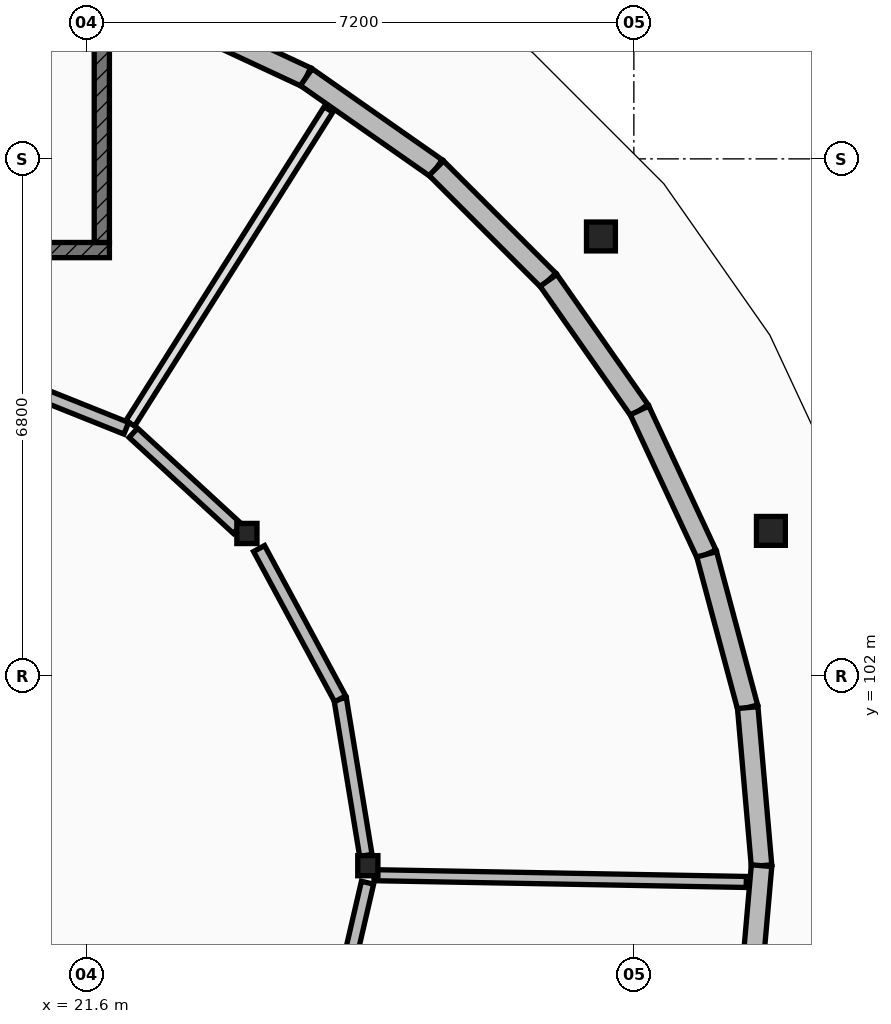
"""IFC4 building model, lengths in metres.
Left out: names, types, materials, properties, quantities, classifications, styles, units other than length and angle.
Written with IfcOpenShell. Run it as: python <this file> out.ifc"""

import sys

from ifc_helpers import new_model, si_unit, direction, frame, frame_2d, origin, origin_2d, place, context, subcontext, project, spatial, rectangle, circle, extrude, element, fill, save


model = new_model("IFC4")
c1 = context("Model", 3, precision=1e-05, world=origin(), true_north=direction((0.0, 1.0)))
c2 = subcontext(c1, "Body", "Model", "MODEL_VIEW")
j1 = project(units=[si_unit("LENGTHUNIT", "METRE"), si_unit("PLANEANGLEUNIT", "RADIAN")], contexts=[c1])
p1 = place(None, origin())
s1 = spatial("IfcSite", under=j1, at=p1, CompositionType="ELEMENT")
p2 = place(p1, origin())
s2 = spatial("IfcBuilding", under=s1, at=p2, CompositionType="ELEMENT")
p3 = place(p2, frame((0.0, 0.0, 21.35)))
s3 = spatial("IfcBuildingStorey", under=s2, at=p3, CompositionType="ELEMENT", Elevation=21.35)
for number, where, z_axis, x_axis in (
    (1, (30.603, 103.905, 0.0), (0.0, 0.0, 1.0), (1.0, 0.0, 0.0)),
    (2, (28.367, 107.779, 0.0), (0.0, 0.0, 1.0), (1.0, 0.0, 0.0)),
):
    element("IfcColumn", number, at=place(p3, frame(where, z_axis=z_axis, x_axis=x_axis)), inside=s3, PredefinedType="PILASTER", context=c2, shape_type="SweptSolid", body=[
        extrude(circle(Radius=0.19, at=origin_2d()), origin(), (0.0, 0.0, 1.0), 4.2),
    ])
for number, where, z_axis, x_axis in (
    (3, (25.3, 99.5, 0.0), (0.0, 0.0, 1.0), (1.0, 0.0, 0.0)),
    (4, (23.709, 103.871, 0.0), (0.0, 0.0, 1.0), (1.0, 0.0, 0.0)),
):
    element("IfcColumn", number, at=place(p3, frame(where, z_axis=z_axis, x_axis=x_axis)), inside=s3, PredefinedType="COLUMN", context=c2, shape_type="SweptSolid", body=[
        extrude(rectangle(XDim=0.265, YDim=0.265, at=origin_2d()), origin(), (0.0, 0.0, 1.0), 4.2),
    ])
p4 = place(p3, frame((22.597, 110.758, 0.0), z_axis=(0.0, 0.0, 1.0), x_axis=(0.906251803004, -0.422738299131, 0.0)))
e5 = element("IfcWall", 5, at=p4, inside=s3, PredefinedType="ELEMENTEDWALL", context=c2, shape_type="SweptSolid", body=[
    extrude(rectangle(XDim=2.089, YDim=0.27, at=frame_2d((1.044, 0.0))), origin(), (0.0, 0.0, 1.0), 3.314),
])
p5 = place(p4, frame((0.534, 0.0, 0.85)))
e6 = element("IfcOpeningElement", 6, at=p5, cuts=e5, PredefinedType="OPENING", context=c2, shape_type="SweptSolid", body=[
    extrude(rectangle(XDim=1.02, YDim=1.6, at=frame_2d((0.51, 0.8))), frame((0.0, 0.145, 0.0), z_axis=(0.0, -1.0, 0.0), x_axis=(1.0, 0.0, 0.0)), (0.0, 0.0, 1.0), 0.29),
])
p6 = place(p3, frame((24.49, 109.875, 0.0), z_axis=(0.0, 0.0, 1.0), x_axis=(0.819155033433, -0.573572167388, 0.0)))
e7 = element("IfcWall", 7, at=p6, inside=s3, PredefinedType="ELEMENTEDWALL", context=c2, shape_type="SweptSolid", body=[
    extrude(rectangle(XDim=2.089, YDim=0.27, at=frame_2d((1.044, 0.0))), origin(), (0.0, 0.0, 1.0), 3.314),
])
p7 = place(p6, frame((0.519, 0.0, 0.85)))
e8 = element("IfcOpeningElement", 8, at=p7, cuts=e7, PredefinedType="OPENING", context=c2, shape_type="SweptSolid", body=[
    extrude(rectangle(XDim=1.05, YDim=1.35, at=frame_2d((0.525, 0.675))), frame((0.0, 0.145, 0.0), z_axis=(0.0, -1.0, 0.0), x_axis=(1.0, 0.0, 0.0)), (0.0, 0.0, 1.0), 0.29),
])
p8 = place(p3, frame((26.201, 108.677, 0.0), z_axis=(0.0, 0.0, 1.0), x_axis=(0.707106781187, -0.707106781187, 0.0)))
e9 = element("IfcWall", 9, at=p8, inside=s3, PredefinedType="ELEMENTEDWALL", context=c2, shape_type="SweptSolid", body=[
    extrude(rectangle(XDim=2.087, YDim=0.27, at=frame_2d((1.044, 0.0))), origin(), (0.0, 0.0, 1.0), 3.314),
])
p9 = place(p8, frame((0.519, 0.0, 0.85)))
e10 = element("IfcOpeningElement", 10, at=p9, cuts=e9, PredefinedType="OPENING", context=c2, shape_type="SweptSolid", body=[
    extrude(rectangle(XDim=1.05, YDim=1.6, at=frame_2d((0.525, 0.8))), frame((0.0, 0.145, 0.0), z_axis=(0.0, -1.0, 0.0), x_axis=(1.0, 0.0, 0.0)), (0.0, 0.0, 1.0), 0.29),
])
p10 = place(p3, frame((27.677, 107.201, 0.0), z_axis=(0.0, 0.0, 1.0), x_axis=(0.573572167388, -0.819155033433, 0.0)))
e11 = element("IfcWall", 11, at=p10, inside=s3, PredefinedType="ELEMENTEDWALL", context=c2, shape_type="SweptSolid", body=[
    extrude(rectangle(XDim=2.089, YDim=0.27, at=frame_2d((1.044, 0.0))), origin(), (0.0, 0.0, 1.0), 3.314),
])
p11 = place(p10, frame((0.519, 0.0, 0.85)))
e12 = element("IfcOpeningElement", 12, at=p11, cuts=e11, PredefinedType="OPENING", context=c2, shape_type="SweptSolid", body=[
    extrude(rectangle(XDim=1.05, YDim=1.9, at=frame_2d((0.525, 0.95))), frame((0.0, 0.145, 0.0), z_axis=(0.0, -1.0, 0.0), x_axis=(1.0, 0.0, 0.0)), (0.0, 0.0, 1.0), 0.29),
])
p12 = place(p3, frame((28.875, 105.49, 0.0), z_axis=(0.0, 0.0, 1.0), x_axis=(0.422738299131, -0.906251803004, 0.0)))
e13 = element("IfcWall", 13, at=p12, inside=s3, PredefinedType="ELEMENTEDWALL", context=c2, shape_type="SweptSolid", body=[
    extrude(rectangle(XDim=2.089, YDim=0.27, at=frame_2d((1.044, 0.0))), origin(), (0.0, 0.0, 1.0), 3.314),
])
p13 = place(p12, frame((0.519, 0.0, 0.85)))
e14 = element("IfcOpeningElement", 14, at=p13, cuts=e13, PredefinedType="OPENING", context=c2, shape_type="SweptSolid", body=[
    extrude(rectangle(XDim=1.05, YDim=2.15, at=frame_2d((0.525, 1.075))), frame((0.0, 0.145, 0.0), z_axis=(0.0, -1.0, 0.0), x_axis=(1.0, 0.0, 0.0)), (0.0, 0.0, 1.0), 0.29),
])
p14 = place(p3, frame((29.758, 103.597, 0.0), z_axis=(0.0, 0.0, 1.0), x_axis=(0.258652308331, -0.965970487849, 0.0)))
e15 = element("IfcWall", 15, at=p14, inside=s3, PredefinedType="ELEMENTEDWALL", context=c2, shape_type="SweptSolid", body=[
    extrude(rectangle(XDim=2.088, YDim=0.27, at=frame_2d((1.044, 0.0))), origin(), (0.0, 0.0, 1.0), 3.314),
])
p15 = place(p14, frame((0.504, 0.0, 0.85)))
e16 = element("IfcOpeningElement", 16, at=p15, cuts=e15, PredefinedType="OPENING", context=c2, shape_type="SweptSolid", body=[
    extrude(rectangle(XDim=1.08, YDim=1.5, at=frame_2d((0.54, 0.75))), frame((0.0, 0.145, 0.0), z_axis=(0.0, -1.0, 0.0), x_axis=(1.0, 0.0, 0.0)), (0.0, 0.0, 1.0), 0.29),
])
p16 = place(p3, frame((30.298, 101.58, 0.0), z_axis=(0.0, 0.0, 1.0), x_axis=(0.087108931964, -0.996198792396, 0.0)))
e17 = element("IfcWall", 17, at=p16, inside=s3, PredefinedType="ELEMENTEDWALL", context=c2, shape_type="SweptSolid", body=[
    extrude(rectangle(XDim=2.088, YDim=0.27, at=frame_2d((1.044, 0.0))), origin(), (0.0, 0.0, 1.0), 3.314),
])
p17 = place(p16, frame((0.504, 0.0, 0.85)))
e18 = element("IfcOpeningElement", 18, at=p17, cuts=e17, PredefinedType="OPENING", context=c2, shape_type="SweptSolid", body=[
    extrude(rectangle(XDim=1.08, YDim=1.8, at=frame_2d((0.54, 0.9))), frame((0.0, 0.145, 0.0), z_axis=(0.0, -1.0, 0.0), x_axis=(1.0, 0.0, 0.0)), (0.0, 0.0, 1.0), 0.29),
])
p18 = place(p3, frame((30.48, 99.5, 0.0), z_axis=(0.0, 0.0, 1.0), x_axis=(-0.087108931964, -0.996198792396, 0.0)))
e19 = element("IfcWall", 19, at=p18, inside=s3, PredefinedType="ELEMENTEDWALL", context=c2, shape_type="SweptSolid", body=[
    extrude(rectangle(XDim=2.088, YDim=0.27, at=frame_2d((1.044, 0.0))), origin(), (0.0, 0.0, 1.0), 3.314),
])
p19 = place(p18, frame((0.494, 0.0, 0.85)))
e20 = element("IfcOpeningElement", 20, at=p19, cuts=e19, PredefinedType="OPENING", context=c2, shape_type="SweptSolid", body=[
    extrude(rectangle(XDim=1.1, YDim=1.25, at=frame_2d((0.55, 0.625))), frame((0.0, 0.145, 0.0), z_axis=(0.0, -1.0, 0.0), x_axis=(1.0, 0.0, 0.0)), (0.0, 0.0, 1.0), 0.29),
])
p20 = place(p3, frame((15.1, 107.6, 0.0), z_axis=(0.0, 0.0, 1.0), x_axis=(1.0, 0.0, 0.0)))
e21 = element("IfcWall", 21, at=p20, inside=s3, PredefinedType="SHEAR", context=c2, shape_type="SweptSolid", body=[
    extrude(rectangle(XDim=6.8, YDim=0.2, at=frame_2d((3.4, 0.0))), origin(), (0.0, 0.0, 1.0), 3.96),
])
p21 = place(p20, frame((0.38, 0.0, 0.0)))
e22 = element("IfcOpeningElement", 22, at=p21, cuts=e21, PredefinedType="OPENING", context=c2, shape_type="SweptSolid", body=[
    extrude(rectangle(XDim=1.1, YDim=2.15, at=frame_2d((0.55, 1.075))), frame((0.0, 0.11, 0.0), z_axis=(0.0, -1.0, 0.0), x_axis=(1.0, 0.0, 0.0)), (0.0, 0.0, 1.0), 0.22),
])
p22 = place(p3, frame((21.8, 107.7, 0.0), z_axis=(0.0, 0.0, 1.0), x_axis=(0.0, 1.0, 0.0)))
e23 = element("IfcWall", 23, at=p22, inside=s3, PredefinedType="SHEAR", context=c2, shape_type="SweptSolid", body=[
    extrude(rectangle(XDim=2.9, YDim=0.2, at=frame_2d((1.45, 0.0))), origin(), (0.0, 0.0, 1.0), 3.96),
])
p23 = place(p3, frame((25.382, 99.375, 0.0), z_axis=(0.0, 0.0, 1.0), x_axis=(0.999834471554, -0.01819421588, 0.0)))
e24 = element("IfcWall", 24, at=p23, inside=s3, PredefinedType="PARTITIONING", context=c2, shape_type="SweptSolid", body=[
    extrude(rectangle(XDim=4.898, YDim=0.145, at=frame_2d((2.449, 0.0))), origin(), (0.0, 0.0, 1.0), 3.279),
])
p24 = place(p3, frame((22.174, 105.32, 0.0), z_axis=(0.0, 0.0, 1.0), x_axis=(0.533929049937, 0.845529283723, 0.0)))
e25 = element("IfcWall", 25, at=p24, inside=s3, PredefinedType="PLUMBINGWALL", context=c2, shape_type="SweptSolid", body=[
    extrude(rectangle(XDim=4.884, YDim=0.135, at=frame_2d((2.442, 0.0))), origin(), (0.0, 0.0, 1.0), 3.279),
])
p25 = place(p3, frame((24.703, 96.715, 0.0), z_axis=(0.0, 0.0, 1.0), x_axis=(0.225605611858, 0.974218716664, 0.0)))
e26 = element("IfcWall", 26, at=p25, inside=s3, PredefinedType="PARTITIONING", context=c2, shape_type="SweptSolid", body=[
    extrude(rectangle(XDim=2.629, YDim=0.165, at=frame_2d((1.314, 0.0))), origin(), (0.0, 0.0, 1.0), 3.279),
])
p26 = place(p3, frame((25.274, 99.635, 0.0), z_axis=(0.0, 0.0, 1.0), x_axis=(-0.161857175328, 0.986814194666, 0.0)))
e27 = element("IfcWall", 27, at=p26, inside=s3, PredefinedType="PARTITIONING", context=c2, shape_type="SweptSolid", body=[
    extrude(rectangle(XDim=2.088, YDim=0.165, at=frame_2d((1.044, 0.0))), origin(), (0.0, 0.0, 1.0), 3.279),
])
p27 = place(p26, frame((0.514, 0.0, 0.0)))
e28 = element("IfcOpeningElement", 28, at=p27, cuts=e27, PredefinedType="OPENING", context=c2, shape_type="SweptSolid", body=[
    extrude(rectangle(XDim=1.06, YDim=2.26, at=frame_2d((0.53, 1.13))), frame((0.0, 0.093, 0.0), z_axis=(0.0, -1.0, 0.0), x_axis=(1.0, 0.0, 0.0)), (0.0, 0.0, 1.0), 0.185),
])
p28 = place(p3, frame((24.936, 101.695, 0.0), z_axis=(0.0, 0.0, 1.0), x_axis=(-0.474805741817, 0.880090624617, 0.0)))
e29 = element("IfcWall", 29, at=p28, inside=s3, PredefinedType="PARTITIONING", context=c2, shape_type="SweptSolid", body=[
    extrude(rectangle(XDim=2.248, YDim=0.165, at=frame_2d((1.124, 0.0))), origin(), (0.0, 0.0, 1.0), 3.279),
])
p29 = place(p3, frame((23.586, 103.933, 0.0), z_axis=(0.0, 0.0, 1.0), x_axis=(-0.735722058644, 0.67728358346, 0.0)))
e30 = element("IfcWall", 30, at=p29, inside=s3, PredefinedType="PARTITIONING", context=c2, shape_type="SweptSolid", body=[
    extrude(rectangle(XDim=1.863, YDim=0.165, at=frame_2d((0.932, 0.0))), origin(), (0.0, 0.0, 1.0), 3.279),
])
p30 = place(p3, frame((22.122, 105.255, 0.0), z_axis=(0.0, 0.0, 1.0), x_axis=(-0.928283943148, 0.371872183544, 0.0)))
e31 = element("IfcWall", 31, at=p30, inside=s3, PredefinedType="PARTITIONING", context=c2, shape_type="SweptSolid", body=[
    extrude(rectangle(XDim=2.448, YDim=0.165, at=frame_2d((1.224, 0.0))), origin(), (0.0, 0.0, 1.0), 3.279),
])
p31 = place(p30, frame((0.754, 0.0, 0.0)))
e32 = element("IfcOpeningElement", 32, at=p31, cuts=e31, PredefinedType="OPENING", context=c2, shape_type="SweptSolid", body=[
    extrude(rectangle(XDim=0.94, YDim=2.1, at=frame_2d((0.47, 1.05))), frame((0.0, 0.093, 0.0), z_axis=(0.0, -1.0, 0.0), x_axis=(1.0, 0.0, 0.0)), (0.0, 0.0, 1.0), 0.185),
])
p32 = place(p5, origin())
e33 = element("IfcWindow", 33, at=p32, inside=s3, PartitioningType="SINGLE_PANEL", PredefinedType="WINDOW", context=c2, shape_type="SweptSolid", body=[
    extrude(rectangle(XDim=1.02, YDim=1.6, at=frame_2d((0.51, 0.8))), frame((0.0, 0.03, 0.0), z_axis=(0.0, -1.0, 0.0), x_axis=(1.0, 0.0, 0.0)), (0.0, 0.0, 1.0), 0.06),
])
fill(e6, e33)
p33 = place(p7, origin())
e34 = element("IfcWindow", 34, at=p33, inside=s3, PartitioningType="SINGLE_PANEL", PredefinedType="WINDOW", context=c2, shape_type="SweptSolid", body=[
    extrude(rectangle(XDim=1.05, YDim=1.35, at=frame_2d((0.525, 0.675))), frame((0.0, 0.03, 0.0), z_axis=(0.0, -1.0, 0.0), x_axis=(1.0, 0.0, 0.0)), (0.0, 0.0, 1.0), 0.06),
])
fill(e8, e34)
p34 = place(p9, origin())
e35 = element("IfcWindow", 35, at=p34, inside=s3, PartitioningType="SINGLE_PANEL", PredefinedType="WINDOW", context=c2, shape_type="SweptSolid", body=[
    extrude(rectangle(XDim=1.05, YDim=1.6, at=frame_2d((0.525, 0.8))), frame((0.0, 0.03, 0.0), z_axis=(0.0, -1.0, 0.0), x_axis=(1.0, 0.0, 0.0)), (0.0, 0.0, 1.0), 0.06),
])
fill(e10, e35)
p35 = place(p11, origin())
e36 = element("IfcWindow", 36, at=p35, inside=s3, PartitioningType="SINGLE_PANEL", PredefinedType="WINDOW", context=c2, shape_type="SweptSolid", body=[
    extrude(rectangle(XDim=1.05, YDim=1.9, at=frame_2d((0.525, 0.95))), frame((0.0, 0.03, 0.0), z_axis=(0.0, -1.0, 0.0), x_axis=(1.0, 0.0, 0.0)), (0.0, 0.0, 1.0), 0.06),
])
fill(e12, e36)
p36 = place(p13, origin())
e37 = element("IfcWindow", 37, at=p36, inside=s3, PartitioningType="SINGLE_PANEL", PredefinedType="WINDOW", context=c2, shape_type="SweptSolid", body=[
    extrude(rectangle(XDim=1.05, YDim=2.15, at=frame_2d((0.525, 1.075))), frame((0.0, 0.03, 0.0), z_axis=(0.0, -1.0, 0.0), x_axis=(1.0, 0.0, 0.0)), (0.0, 0.0, 1.0), 0.06),
])
fill(e14, e37)
p37 = place(p15, origin())
e38 = element("IfcWindow", 38, at=p37, inside=s3, PartitioningType="SINGLE_PANEL", PredefinedType="WINDOW", context=c2, shape_type="SweptSolid", body=[
    extrude(rectangle(XDim=1.08, YDim=1.5, at=frame_2d((0.54, 0.75))), frame((0.0, 0.03, 0.0), z_axis=(0.0, -1.0, 0.0), x_axis=(1.0, 0.0, 0.0)), (0.0, 0.0, 1.0), 0.06),
])
fill(e16, e38)
p38 = place(p17, origin())
e39 = element("IfcWindow", 39, at=p38, inside=s3, PartitioningType="SINGLE_PANEL", PredefinedType="WINDOW", context=c2, shape_type="SweptSolid", body=[
    extrude(rectangle(XDim=1.08, YDim=1.8, at=frame_2d((0.54, 0.9))), frame((0.0, 0.03, 0.0), z_axis=(0.0, -1.0, 0.0), x_axis=(1.0, 0.0, 0.0)), (0.0, 0.0, 1.0), 0.06),
])
fill(e18, e39)
p39 = place(p19, origin())
e40 = element("IfcWindow", 40, at=p39, inside=s3, PartitioningType="SINGLE_PANEL", PredefinedType="WINDOW", context=c2, shape_type="SweptSolid", body=[
    extrude(rectangle(XDim=1.1, YDim=1.25, at=frame_2d((0.55, 0.625))), frame((0.0, 0.03, 0.0), z_axis=(0.0, -1.0, 0.0), x_axis=(1.0, 0.0, 0.0)), (0.0, 0.0, 1.0), 0.06),
])
fill(e20, e40)
p40 = place(p27, origin())
e41 = element("IfcDoor", 41, at=p40, inside=s3, OperationType="SINGLE_SWING_RIGHT", PredefinedType="DOOR", context=c2, shape_type="SweptSolid", body=[
    extrude(rectangle(XDim=1.06, YDim=2.26, at=frame_2d((0.53, 1.13))), frame((0.0, 0.025, 0.0), z_axis=(0.0, -1.0, 0.0), x_axis=(1.0, 0.0, 0.0)), (0.0, 0.0, 1.0), 0.05),
])
fill(e28, e41)
p41 = place(p31, origin())
e42 = element("IfcDoor", 42, at=p41, inside=s3, OperationType="SINGLE_SWING_LEFT", PredefinedType="DOOR", context=c2, shape_type="SweptSolid", body=[
    extrude(rectangle(XDim=0.94, YDim=2.1, at=frame_2d((0.47, 1.05))), frame((0.0, 0.025, 0.0), z_axis=(0.0, -1.0, 0.0), x_axis=(1.0, 0.0, 0.0)), (0.0, 0.0, 1.0), 0.05),
])
fill(e32, e42)
save(model, sys.argv[1])
